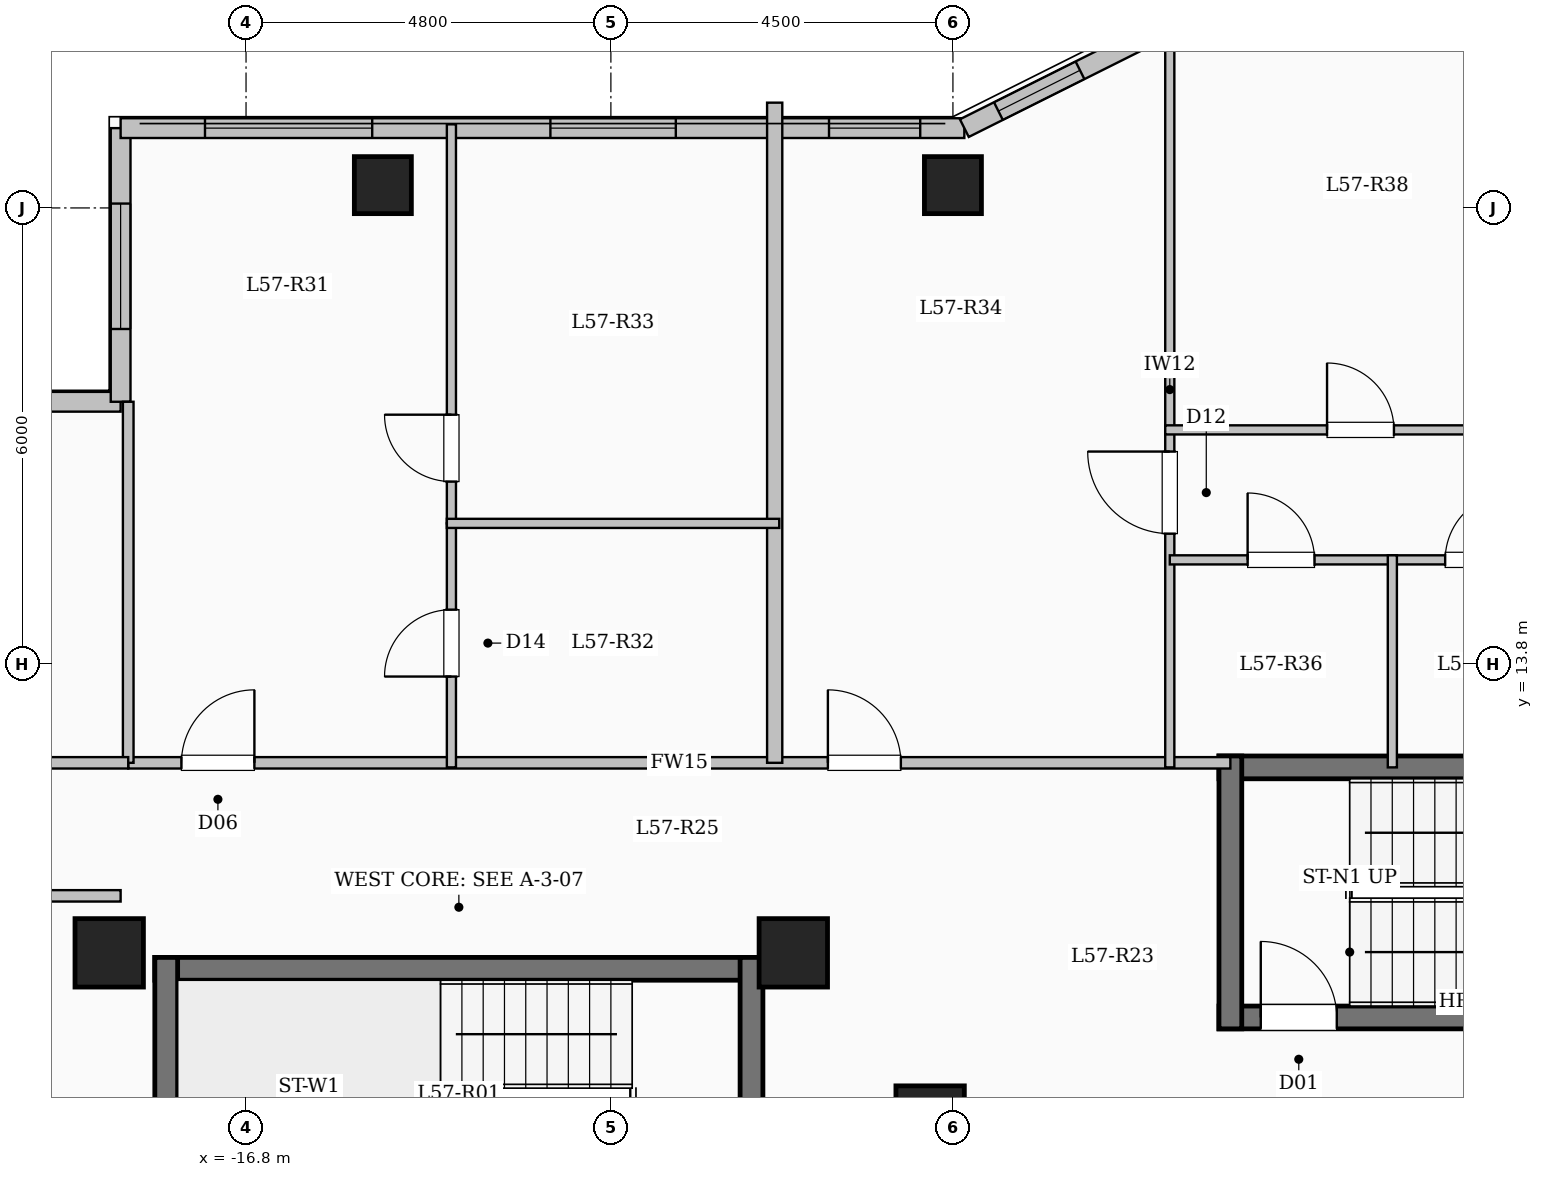
"""IFC4 building model, lengths in metres.
Left out: names, types, materials, properties, quantities, classifications, styles, units other than length and angle.
Written with IfcOpenShell. Run it as: python <this file> out.ifc"""

import sys

from ifc_helpers import new_model, si_unit, direction, frame, frame_2d, origin, origin_2d, place, context, subcontext, project, spatial, rectangle, extrude, element, fill, save


model = new_model("IFC4")
c1 = context("Model", 3, precision=1e-05, world=origin(), true_north=direction((0.0, 1.0)))
c2 = subcontext(c1, "Body", "Model", "MODEL_VIEW")
j1 = project(units=[si_unit("LENGTHUNIT", "METRE"), si_unit("PLANEANGLEUNIT", "RADIAN")], contexts=[c1])
p1 = place(None, origin())
s1 = spatial("IfcSite", under=j1, at=p1, CompositionType="ELEMENT")
p2 = place(p1, origin())
s2 = spatial("IfcBuilding", under=s1, at=p2, CompositionType="ELEMENT")
p3 = place(p2, frame((0.0, 0.0, 210.35)))
s3 = spatial("IfcBuildingStorey", under=s2, at=p3, CompositionType="ELEMENT", Elevation=210.35)
for number, where, z_axis, x_axis in (
    (1, (-7.8, 7.8, 0.0), (0.0, 0.0, 1.0), (1.0, 0.0, 0.0)),
    (2, (-9.6, 10.0, 0.0), (0.0, 0.0, 1.0), (1.0, 0.0, 0.0)),
    (3, (-18.6, 10.0, 0.0), (0.0, 0.0, 1.0), (1.0, 0.0, 0.0)),
):
    element("IfcColumn", number, at=place(p3, frame(where, z_axis=z_axis, x_axis=x_axis)), inside=s3, PredefinedType="COLUMN", context=c2, shape_type="SweptSolid", body=[
        extrude(rectangle(XDim=0.9, YDim=0.9, at=origin_2d()), origin(), (0.0, 0.0, 1.0), 3.35),
    ])
for number, where, z_axis, x_axis in (
    (4, (-15.0, 20.1, 0.0), (0.0, 0.0, 1.0), (1.0, 0.0, 0.0)),
    (5, (-7.5, 20.1, 0.0), (0.0, 0.0, 1.0), (1.0, 0.0, 0.0)),
):
    element("IfcColumn", number, at=place(p3, frame(where, z_axis=z_axis, x_axis=x_axis)), inside=s3, PredefinedType="COLUMN", context=c2, shape_type="SweptSolid", body=[
        extrude(rectangle(XDim=0.75, YDim=0.75, at=origin_2d()), origin(), (0.0, 0.0, 1.0), 3.35),
    ])
p4 = place(p3, frame((-23.55, 17.25, 0.0), z_axis=(0.0, 0.0, 1.0), x_axis=(1.0, 0.0, 0.0)))
e6 = element("IfcWall", 6, at=p4, inside=s3, PredefinedType="SOLIDWALL", context=c2, shape_type="SweptSolid", body=[
    extrude(rectangle(XDim=5.1, YDim=0.26, at=frame_2d((2.55, 0.0))), origin(), (0.0, 0.0, 1.0), 3.1),
])
p5 = place(p4, frame((1.575, 0.0, 0.9)))
e7 = element("IfcOpeningElement", 7, at=p5, cuts=e6, PredefinedType="OPENING", context=c2, shape_type="SweptSolid", body=[
    extrude(rectangle(XDim=2.0, YDim=1.7, at=frame_2d((1.0, 0.85))), frame((0.0, 0.14, 0.0), z_axis=(0.0, -1.0, 0.0), x_axis=(1.0, 0.0, 0.0)), (0.0, 0.0, 1.0), 0.28),
])
p6 = place(p3, frame((-18.45, 17.25, 0.0), z_axis=(0.0, 0.0, 1.0), x_axis=(0.0, 1.0, 0.0)))
e8 = element("IfcWall", 8, at=p6, inside=s3, PredefinedType="SOLIDWALL", context=c2, shape_type="SweptSolid", body=[
    extrude(rectangle(XDim=3.6, YDim=0.26, at=frame_2d((1.8, 0.0))), origin(), (0.0, 0.0, 1.0), 3.1),
])
p7 = place(p6, frame((0.958, 0.0, 0.9)))
e9 = element("IfcOpeningElement", 9, at=p7, cuts=e8, PredefinedType="OPENING", context=c2, shape_type="SweptSolid", body=[
    extrude(rectangle(XDim=1.65, YDim=1.6, at=frame_2d((0.825, 0.8))), frame((0.0, 0.14, 0.0), z_axis=(0.0, -1.0, 0.0), x_axis=(1.0, 0.0, 0.0)), (0.0, 0.0, 1.0), 0.28),
])
p8 = place(p3, frame((-18.45, 20.85, 0.0), z_axis=(0.0, 0.0, 1.0), x_axis=(1.0, 0.0, 0.0)))
e10 = element("IfcWall", 10, at=p8, inside=s3, PredefinedType="SOLIDWALL", context=c2, shape_type="SweptSolid", body=[
    extrude(rectangle(XDim=11.1, YDim=0.26, at=frame_2d((5.55, 0.0))), origin(), (0.0, 0.0, 1.0), 3.1),
])
p9 = place(p8, frame((1.11, 0.0, 0.9)))
e11 = element("IfcOpeningElement", 11, at=p9, cuts=e10, PredefinedType="OPENING", context=c2, shape_type="SweptSolid", body=[
    extrude(rectangle(XDim=2.2, YDim=1.75, at=frame_2d((1.1, 0.875))), frame((0.0, 0.14, 0.0), z_axis=(0.0, -1.0, 0.0), x_axis=(1.0, 0.0, 0.0)), (0.0, 0.0, 1.0), 0.28),
])
p10 = place(p8, frame((5.654, 0.0, 0.9)))
e12 = element("IfcOpeningElement", 12, at=p10, cuts=e10, PredefinedType="OPENING", context=c2, shape_type="SweptSolid", body=[
    extrude(rectangle(XDim=1.65, YDim=1.6, at=frame_2d((0.825, 0.8))), frame((0.0, 0.14, 0.0), z_axis=(0.0, -1.0, 0.0), x_axis=(1.0, 0.0, 0.0)), (0.0, 0.0, 1.0), 0.28),
])
p11 = place(p8, frame((9.32, 0.0, 0.95)))
e13 = element("IfcOpeningElement", 13, at=p11, cuts=e10, PredefinedType="OPENING", context=c2, shape_type="SweptSolid", body=[
    extrude(rectangle(XDim=1.2, YDim=1.5, at=frame_2d((0.6, 0.75))), frame((0.0, 0.14, 0.0), z_axis=(0.0, -1.0, 0.0), x_axis=(1.0, 0.0, 0.0)), (0.0, 0.0, 1.0), 0.28),
])
p12 = place(p3, frame((-7.35, 20.85, 0.0), z_axis=(0.0, 0.0, 1.0), x_axis=(0.894427191, 0.4472135955, 0.0)))
e14 = element("IfcWall", 14, at=p12, inside=s3, PredefinedType="SOLIDWALL", context=c2, shape_type="SweptSolid", body=[
    extrude(rectangle(XDim=3.354, YDim=0.26, at=frame_2d((1.677, 0.0))), origin(), (0.0, 0.0, 1.0), 3.1),
])
p13 = place(p12, frame((0.501, 0.0, 0.95)))
e15 = element("IfcOpeningElement", 15, at=p13, cuts=e14, PredefinedType="OPENING", context=c2, shape_type="SweptSolid", body=[
    extrude(rectangle(XDim=1.2, YDim=1.5, at=frame_2d((0.6, 0.75))), frame((0.0, 0.14, 0.0), z_axis=(0.0, -1.0, 0.0), x_axis=(1.0, 0.0, 0.0)), (0.0, 0.0, 1.0), 0.28),
])
p14 = place(p3, frame((-18.0, 9.79, 0.0), z_axis=(0.0, 0.0, 1.0), x_axis=(1.0, 0.0, 0.0)))
e16 = element("IfcWall", 16, at=p14, inside=s3, PredefinedType="SHEAR", context=c2, shape_type="SweptSolid", body=[
    extrude(rectangle(XDim=8.0, YDim=0.3, at=frame_2d((4.0, 0.0))), origin(), (0.0, 0.0, 1.0), 3.35),
])
for number, where, z_axis, x_axis in (
    (17, (-17.85, 6.35, 0.0), (0.0, 0.0, 1.0), (0.0, 1.0, 0.0)),
    (18, (-10.15, 6.35, 0.0), (0.0, 0.0, 1.0), (0.0, 1.0, 0.0)),
):
    element("IfcWall", number, at=place(p3, frame(where, z_axis=z_axis, x_axis=x_axis)), inside=s3, PredefinedType="SHEAR", context=c2, shape_type="SweptSolid", body=[
        extrude(rectangle(XDim=3.59, YDim=0.3, at=frame_2d((1.795, 0.0))), origin(), (0.0, 0.0, 1.0), 3.35),
    ])
p15 = place(p3, frame((-4.0, 12.44, 0.0), z_axis=(0.0, 0.0, 1.0), x_axis=(1.0, 0.0, 0.0)))
e19 = element("IfcWall", 19, at=p15, inside=s3, PredefinedType="SHEAR", context=c2, shape_type="SweptSolid", body=[
    extrude(rectangle(XDim=8.0, YDim=0.3, at=frame_2d((4.0, 0.0))), origin(), (0.0, 0.0, 1.0), 3.35),
])
p16 = place(p3, frame((-4.0, 9.15, 0.0), z_axis=(0.0, 0.0, 1.0), x_axis=(1.0, 0.0, 0.0)))
e20 = element("IfcWall", 20, at=p16, inside=s3, PredefinedType="SHEAR", context=c2, shape_type="SweptSolid", body=[
    extrude(rectangle(XDim=8.0, YDim=0.3, at=frame_2d((4.0, 0.0))), origin(), (0.0, 0.0, 1.0), 3.35),
])
p17 = place(p16, frame((0.55, 0.0, 0.0)))
e21 = element("IfcOpeningElement", 21, at=p17, cuts=e20, PredefinedType="OPENING", context=c2, shape_type="SweptSolid", body=[
    extrude(rectangle(XDim=1.0, YDim=2.15, at=frame_2d((0.5, 1.075))), frame((0.0, 0.16, 0.0), z_axis=(0.0, -1.0, 0.0), x_axis=(1.0, 0.0, 0.0)), (0.0, 0.0, 1.0), 0.32),
])
p18 = place(p3, frame((-3.85, 9.0, 0.0), z_axis=(0.0, 0.0, 1.0), x_axis=(0.0, 1.0, 0.0)))
e22 = element("IfcWall", 22, at=p18, inside=s3, PredefinedType="SHEAR", context=c2, shape_type="SweptSolid", body=[
    extrude(rectangle(XDim=3.59, YDim=0.3, at=frame_2d((1.795, 0.0))), origin(), (0.0, 0.0, 1.0), 3.35),
])
p19 = place(p3, frame((-18.35, 12.5, 0.0), z_axis=(0.0, 0.0, 1.0), x_axis=(1.0, 0.0, 0.0)))
e23 = element("IfcWall", 23, at=p19, inside=s3, PredefinedType="PARTITIONING", context=c2, shape_type="SweptSolid", body=[
    extrude(rectangle(XDim=14.5, YDim=0.15, at=frame_2d((7.25, 0.0))), origin(), (0.0, 0.0, 1.0), 3.1),
])
p20 = place(p19, frame((0.7, 0.0, 0.0)))
e24 = element("IfcOpeningElement", 24, at=p20, cuts=e23, PredefinedType="OPENING", context=c2, shape_type="SweptSolid", body=[
    extrude(rectangle(XDim=0.96, YDim=2.15, at=frame_2d((0.48, 1.075))), frame((0.0, 0.085, 0.0), z_axis=(0.0, -1.0, 0.0), x_axis=(1.0, 0.0, 0.0)), (0.0, 0.0, 1.0), 0.17),
])
p21 = place(p19, frame((9.205, 0.0, 0.0)))
e25 = element("IfcOpeningElement", 25, at=p21, cuts=e23, PredefinedType="OPENING", context=c2, shape_type="SweptSolid", body=[
    extrude(rectangle(XDim=0.96, YDim=2.15, at=frame_2d((0.48, 1.075))), frame((0.0, 0.085, 0.0), z_axis=(0.0, -1.0, 0.0), x_axis=(1.0, 0.0, 0.0)), (0.0, 0.0, 1.0), 0.17),
])
p22 = place(p3, frame((-9.845, 12.5, 0.0), z_axis=(0.0, 0.0, 1.0), x_axis=(0.0, 1.0, 0.0)))
e26 = element("IfcWall", 26, at=p22, inside=s3, PredefinedType="SOLIDWALL", context=c2, shape_type="SweptSolid", body=[
    extrude(rectangle(XDim=8.685, YDim=0.2, at=frame_2d((4.343, 0.0))), origin(), (0.0, 0.0, 1.0), 3.1),
])
p23 = place(p3, frame((-14.098, 12.44, 0.0), z_axis=(0.0, 0.0, 1.0), x_axis=(0.0, 1.0, 0.0)))
e27 = element("IfcWall", 27, at=p23, inside=s3, PredefinedType="PARTITIONING", context=c2, shape_type="SweptSolid", body=[
    extrude(rectangle(XDim=3.21, YDim=0.12, at=frame_2d((1.605, 0.0))), origin(), (0.0, 0.0, 1.0), 3.1),
])
p24 = place(p23, frame((1.195, 0.0, 0.0)))
e28 = element("IfcOpeningElement", 28, at=p24, cuts=e27, PredefinedType="OPENING", context=c2, shape_type="SweptSolid", body=[
    extrude(rectangle(XDim=0.88, YDim=2.1, at=frame_2d((0.44, 1.05))), frame((0.0, 0.07, 0.0), z_axis=(0.0, -1.0, 0.0), x_axis=(1.0, 0.0, 0.0)), (0.0, 0.0, 1.0), 0.14),
])
p25 = place(p3, frame((-14.098, 15.65, 0.0), z_axis=(0.0, 0.0, 1.0), x_axis=(0.0, 1.0, 0.0)))
e29 = element("IfcWall", 29, at=p25, inside=s3, PredefinedType="PARTITIONING", context=c2, shape_type="SweptSolid", body=[
    extrude(rectangle(XDim=5.25, YDim=0.12, at=frame_2d((2.625, 0.0))), origin(), (0.0, 0.0, 1.0), 3.1),
])
p26 = place(p25, frame((0.55, 0.0, 0.0)))
e30 = element("IfcOpeningElement", 30, at=p26, cuts=e29, PredefinedType="OPENING", context=c2, shape_type="SweptSolid", body=[
    extrude(rectangle(XDim=0.88, YDim=2.1, at=frame_2d((0.44, 1.05))), frame((0.0, 0.07, 0.0), z_axis=(0.0, -1.0, 0.0), x_axis=(1.0, 0.0, 0.0)), (0.0, 0.0, 1.0), 0.14),
])
p27 = place(p3, frame((-14.158, 15.65, 0.0), z_axis=(0.0, 0.0, 1.0), x_axis=(1.0, 0.0, 0.0)))
e31 = element("IfcWall", 31, at=p27, inside=s3, PredefinedType="PARTITIONING", context=c2, shape_type="SweptSolid", body=[
    extrude(rectangle(XDim=4.373, YDim=0.12, at=frame_2d((2.187, 0.0))), origin(), (0.0, 0.0, 1.0), 2.725),
])
p28 = place(p3, frame((-4.647, 12.44, 0.0), z_axis=(0.0, 0.0, 1.0), x_axis=(0.0, 1.0, 0.0)))
e32 = element("IfcWall", 32, at=p28, inside=s3, PredefinedType="PARTITIONING", context=c2, shape_type="SweptSolid", body=[
    extrude(rectangle(XDim=9.94, YDim=0.12, at=frame_2d((4.97, 0.0))), origin(), (0.0, 0.0, 1.0), 3.1),
])
p29 = place(p28, frame((3.075, 0.0, 0.0)))
e33 = element("IfcOpeningElement", 33, at=p29, cuts=e32, PredefinedType="OPENING", context=c2, shape_type="SweptSolid", body=[
    extrude(rectangle(XDim=1.08, YDim=2.15, at=frame_2d((0.54, 1.075))), frame((0.0, 0.07, 0.0), z_axis=(0.0, -1.0, 0.0), x_axis=(1.0, 0.0, 0.0)), (0.0, 0.0, 1.0), 0.14),
])
p30 = place(p3, frame((-4.647, 15.17, 0.0), z_axis=(0.0, 0.0, 1.0), x_axis=(1.0, 0.0, 0.0)))
e34 = element("IfcWall", 34, at=p30, inside=s3, PredefinedType="PARTITIONING", context=c2, shape_type="SweptSolid", body=[
    extrude(rectangle(XDim=2.928, YDim=0.12, at=frame_2d((1.464, 0.0))), origin(), (0.0, 0.0, 1.0), 3.1),
])
p31 = place(p30, frame((1.024, 0.0, 0.0)))
e35 = element("IfcOpeningElement", 35, at=p31, cuts=e34, PredefinedType="OPENING", context=c2, shape_type="SweptSolid", body=[
    extrude(rectangle(XDim=0.88, YDim=2.1, at=frame_2d((0.44, 1.05))), frame((0.0, 0.07, 0.0), z_axis=(0.0, -1.0, 0.0), x_axis=(1.0, 0.0, 0.0)), (0.0, 0.0, 1.0), 0.14),
])
p32 = place(p3, frame((-1.719, 15.17, 0.0), z_axis=(0.0, 0.0, 1.0), x_axis=(1.0, 0.0, 0.0)))
e36 = element("IfcWall", 36, at=p32, inside=s3, PredefinedType="PARTITIONING", context=c2, shape_type="SweptSolid", body=[
    extrude(rectangle(XDim=2.269, YDim=0.12, at=frame_2d((1.135, 0.0))), origin(), (0.0, 0.0, 1.0), 3.1),
])
p33 = place(p32, frame((0.695, 0.0, 0.0)))
e37 = element("IfcOpeningElement", 37, at=p33, cuts=e36, PredefinedType="OPENING", context=c2, shape_type="SweptSolid", body=[
    extrude(rectangle(XDim=0.88, YDim=2.1, at=frame_2d((0.44, 1.05))), frame((0.0, 0.07, 0.0), z_axis=(0.0, -1.0, 0.0), x_axis=(1.0, 0.0, 0.0)), (0.0, 0.0, 1.0), 0.14),
])
p34 = place(p3, frame((-4.707, 16.88, 0.0), z_axis=(0.0, 0.0, 1.0), x_axis=(1.0, 0.0, 0.0)))
e38 = element("IfcWall", 38, at=p34, inside=s3, PredefinedType="PARTITIONING", context=c2, shape_type="SweptSolid", body=[
    extrude(rectangle(XDim=5.317, YDim=0.12, at=frame_2d((2.659, 0.0))), origin(), (0.0, 0.0, 1.0), 2.725),
])
p35 = place(p34, frame((2.129, 0.0, 0.0)))
e39 = element("IfcOpeningElement", 39, at=p35, cuts=e38, PredefinedType="OPENING", context=c2, shape_type="SweptSolid", body=[
    extrude(rectangle(XDim=0.88, YDim=2.1, at=frame_2d((0.44, 1.05))), frame((0.0, 0.07, 0.0), z_axis=(0.0, -1.0, 0.0), x_axis=(1.0, 0.0, 0.0)), (0.0, 0.0, 1.0), 0.14),
])
p36 = place(p3, frame((-1.719, 12.44, 0.0), z_axis=(0.0, 0.0, 1.0), x_axis=(0.0, 1.0, 0.0)))
e40 = element("IfcWall", 40, at=p36, inside=s3, PredefinedType="PARTITIONING", context=c2, shape_type="SweptSolid", body=[
    extrude(rectangle(XDim=2.79, YDim=0.12, at=frame_2d((1.395, 0.0))), origin(), (0.0, 0.0, 1.0), 3.1),
])
p37 = place(p3, frame((-23.58, 10.75, 0.0), z_axis=(0.0, 0.0, 1.0), x_axis=(1.0, 0.0, 0.0)))
e41 = element("IfcWall", 41, at=p37, inside=s3, PredefinedType="PARTITIONING", context=c2, shape_type="SweptSolid", body=[
    extrude(rectangle(XDim=5.13, YDim=0.15, at=frame_2d((2.565, 0.0))), origin(), (0.0, 0.0, 1.0), 3.1),
])
p38 = place(p3, frame((-18.35, 12.5, 0.0), z_axis=(0.0, 0.0, 1.0), x_axis=(0.0, 1.0, 0.0)))
e42 = element("IfcWall", 42, at=p38, inside=s3, PredefinedType="PARTITIONING", context=c2, shape_type="SweptSolid", body=[
    extrude(rectangle(XDim=4.75, YDim=0.14, at=frame_2d((2.375, 0.0))), origin(), (0.0, 0.0, 1.0), 3.1),
])
p39 = place(p3, frame((-23.58, 12.5, 0.0), z_axis=(0.0, 0.0, 1.0), x_axis=(1.0, 0.0, 0.0)))
e43 = element("IfcWall", 43, at=p39, inside=s3, PredefinedType="PARTITIONING", context=c2, shape_type="SweptSolid", body=[
    extrude(rectangle(XDim=5.23, YDim=0.15, at=frame_2d((2.615, 0.0))), origin(), (0.0, 0.0, 1.0), 3.1),
])
p40 = place(p39, frame((2.14, 0.0, 0.0)))
e44 = element("IfcOpeningElement", 44, at=p40, cuts=e43, PredefinedType="OPENING", context=c2, shape_type="SweptSolid", body=[
    extrude(rectangle(XDim=0.95, YDim=2.15, at=frame_2d((0.475, 1.075))), frame((0.0, 0.085, 0.0), z_axis=(0.0, -1.0, 0.0), x_axis=(1.0, 0.0, 0.0)), (0.0, 0.0, 1.0), 0.17),
])
p41 = place(p7, origin())
e45 = element("IfcWindow", 45, at=p41, inside=s3, PartitioningType="SINGLE_PANEL", PredefinedType="WINDOW", context=c2, shape_type="SweptSolid", body=[
    extrude(rectangle(XDim=1.65, YDim=1.6, at=frame_2d((0.825, 0.8))), frame((0.0, 0.03, 0.0), z_axis=(0.0, -1.0, 0.0), x_axis=(1.0, 0.0, 0.0)), (0.0, 0.0, 1.0), 0.06),
])
fill(e9, e45)
p42 = place(p9, origin())
e46 = element("IfcWindow", 46, at=p42, inside=s3, PartitioningType="SINGLE_PANEL", PredefinedType="WINDOW", context=c2, shape_type="SweptSolid", body=[
    extrude(rectangle(XDim=2.2, YDim=1.75, at=frame_2d((1.1, 0.875))), frame((0.0, 0.03, 0.0), z_axis=(0.0, -1.0, 0.0), x_axis=(1.0, 0.0, 0.0)), (0.0, 0.0, 1.0), 0.06),
])
fill(e11, e46)
p43 = place(p10, origin())
e47 = element("IfcWindow", 47, at=p43, inside=s3, PartitioningType="SINGLE_PANEL", PredefinedType="WINDOW", context=c2, shape_type="SweptSolid", body=[
    extrude(rectangle(XDim=1.65, YDim=1.6, at=frame_2d((0.825, 0.8))), frame((0.0, 0.03, 0.0), z_axis=(0.0, -1.0, 0.0), x_axis=(1.0, 0.0, 0.0)), (0.0, 0.0, 1.0), 0.06),
])
fill(e12, e47)
p44 = place(p11, origin())
e48 = element("IfcWindow", 48, at=p44, inside=s3, PartitioningType="SINGLE_PANEL", PredefinedType="WINDOW", context=c2, shape_type="SweptSolid", body=[
    extrude(rectangle(XDim=1.2, YDim=1.5, at=frame_2d((0.6, 0.75))), frame((0.0, 0.03, 0.0), z_axis=(0.0, -1.0, 0.0), x_axis=(1.0, 0.0, 0.0)), (0.0, 0.0, 1.0), 0.06),
])
fill(e13, e48)
p45 = place(p13, origin())
e49 = element("IfcWindow", 49, at=p45, inside=s3, PartitioningType="SINGLE_PANEL", PredefinedType="WINDOW", context=c2, shape_type="SweptSolid", body=[
    extrude(rectangle(XDim=1.2, YDim=1.5, at=frame_2d((0.6, 0.75))), frame((0.0, 0.03, 0.0), z_axis=(0.0, -1.0, 0.0), x_axis=(1.0, 0.0, 0.0)), (0.0, 0.0, 1.0), 0.06),
])
fill(e15, e49)
p46 = place(p17, origin())
e50 = element("IfcDoor", 50, at=p46, inside=s3, OperationType="SINGLE_SWING_LEFT", PredefinedType="DOOR", context=c2, shape_type="SweptSolid", body=[
    extrude(rectangle(XDim=1.0, YDim=2.15, at=frame_2d((0.5, 1.075))), frame((0.0, 0.025, 0.0), z_axis=(0.0, -1.0, 0.0), x_axis=(1.0, 0.0, 0.0)), (0.0, 0.0, 1.0), 0.05),
])
fill(e21, e50)
p47 = place(p20, origin())
e51 = element("IfcDoor", 51, at=p47, inside=s3, OperationType="SINGLE_SWING_RIGHT", PredefinedType="DOOR", context=c2, shape_type="SweptSolid", body=[
    extrude(rectangle(XDim=0.96, YDim=2.15, at=frame_2d((0.48, 1.075))), frame((0.0, 0.025, 0.0), z_axis=(0.0, -1.0, 0.0), x_axis=(1.0, 0.0, 0.0)), (0.0, 0.0, 1.0), 0.05),
])
fill(e24, e51)
p48 = place(p24, origin())
e52 = element("IfcDoor", 52, at=p48, inside=s3, OperationType="SINGLE_SWING_LEFT", PredefinedType="DOOR", context=c2, shape_type="SweptSolid", body=[
    extrude(rectangle(XDim=0.88, YDim=2.1, at=frame_2d((0.44, 1.05))), frame((0.0, 0.025, 0.0), z_axis=(0.0, -1.0, 0.0), x_axis=(1.0, 0.0, 0.0)), (0.0, 0.0, 1.0), 0.05),
])
fill(e28, e52)
p49 = place(p26, origin())
e53 = element("IfcDoor", 53, at=p49, inside=s3, OperationType="SINGLE_SWING_RIGHT", PredefinedType="DOOR", context=c2, shape_type="SweptSolid", body=[
    extrude(rectangle(XDim=0.88, YDim=2.1, at=frame_2d((0.44, 1.05))), frame((0.0, 0.025, 0.0), z_axis=(0.0, -1.0, 0.0), x_axis=(1.0, 0.0, 0.0)), (0.0, 0.0, 1.0), 0.05),
])
fill(e30, e53)
p50 = place(p21, origin())
e54 = element("IfcDoor", 54, at=p50, inside=s3, OperationType="SINGLE_SWING_LEFT", PredefinedType="DOOR", context=c2, shape_type="SweptSolid", body=[
    extrude(rectangle(XDim=0.96, YDim=2.15, at=frame_2d((0.48, 1.075))), frame((0.0, 0.025, 0.0), z_axis=(0.0, -1.0, 0.0), x_axis=(1.0, 0.0, 0.0)), (0.0, 0.0, 1.0), 0.05),
])
fill(e25, e54)
p51 = place(p29, origin())
e55 = element("IfcDoor", 55, at=p51, inside=s3, OperationType="SINGLE_SWING_RIGHT", PredefinedType="DOOR", context=c2, shape_type="SweptSolid", body=[
    extrude(rectangle(XDim=1.08, YDim=2.15, at=frame_2d((0.54, 1.075))), frame((0.0, 0.025, 0.0), z_axis=(0.0, -1.0, 0.0), x_axis=(1.0, 0.0, 0.0)), (0.0, 0.0, 1.0), 0.05),
])
fill(e33, e55)
p52 = place(p31, origin())
e56 = element("IfcDoor", 56, at=p52, inside=s3, OperationType="SINGLE_SWING_LEFT", PredefinedType="DOOR", context=c2, shape_type="SweptSolid", body=[
    extrude(rectangle(XDim=0.88, YDim=2.1, at=frame_2d((0.44, 1.05))), frame((0.0, 0.025, 0.0), z_axis=(0.0, -1.0, 0.0), x_axis=(1.0, 0.0, 0.0)), (0.0, 0.0, 1.0), 0.05),
])
fill(e35, e56)
p53 = place(p33, origin())
e57 = element("IfcDoor", 57, at=p53, inside=s3, OperationType="SINGLE_SWING_RIGHT", PredefinedType="DOOR", context=c2, shape_type="SweptSolid", body=[
    extrude(rectangle(XDim=0.88, YDim=2.1, at=frame_2d((0.44, 1.05))), frame((0.0, 0.025, 0.0), z_axis=(0.0, -1.0, 0.0), x_axis=(1.0, 0.0, 0.0)), (0.0, 0.0, 1.0), 0.05),
])
fill(e37, e57)
p54 = place(p35, origin())
e58 = element("IfcDoor", 58, at=p54, inside=s3, OperationType="SINGLE_SWING_LEFT", PredefinedType="DOOR", context=c2, shape_type="SweptSolid", body=[
    extrude(rectangle(XDim=0.88, YDim=2.1, at=frame_2d((0.44, 1.05))), frame((0.0, 0.025, 0.0), z_axis=(0.0, -1.0, 0.0), x_axis=(1.0, 0.0, 0.0)), (0.0, 0.0, 1.0), 0.05),
])
fill(e39, e58)
save(model, sys.argv[1])
